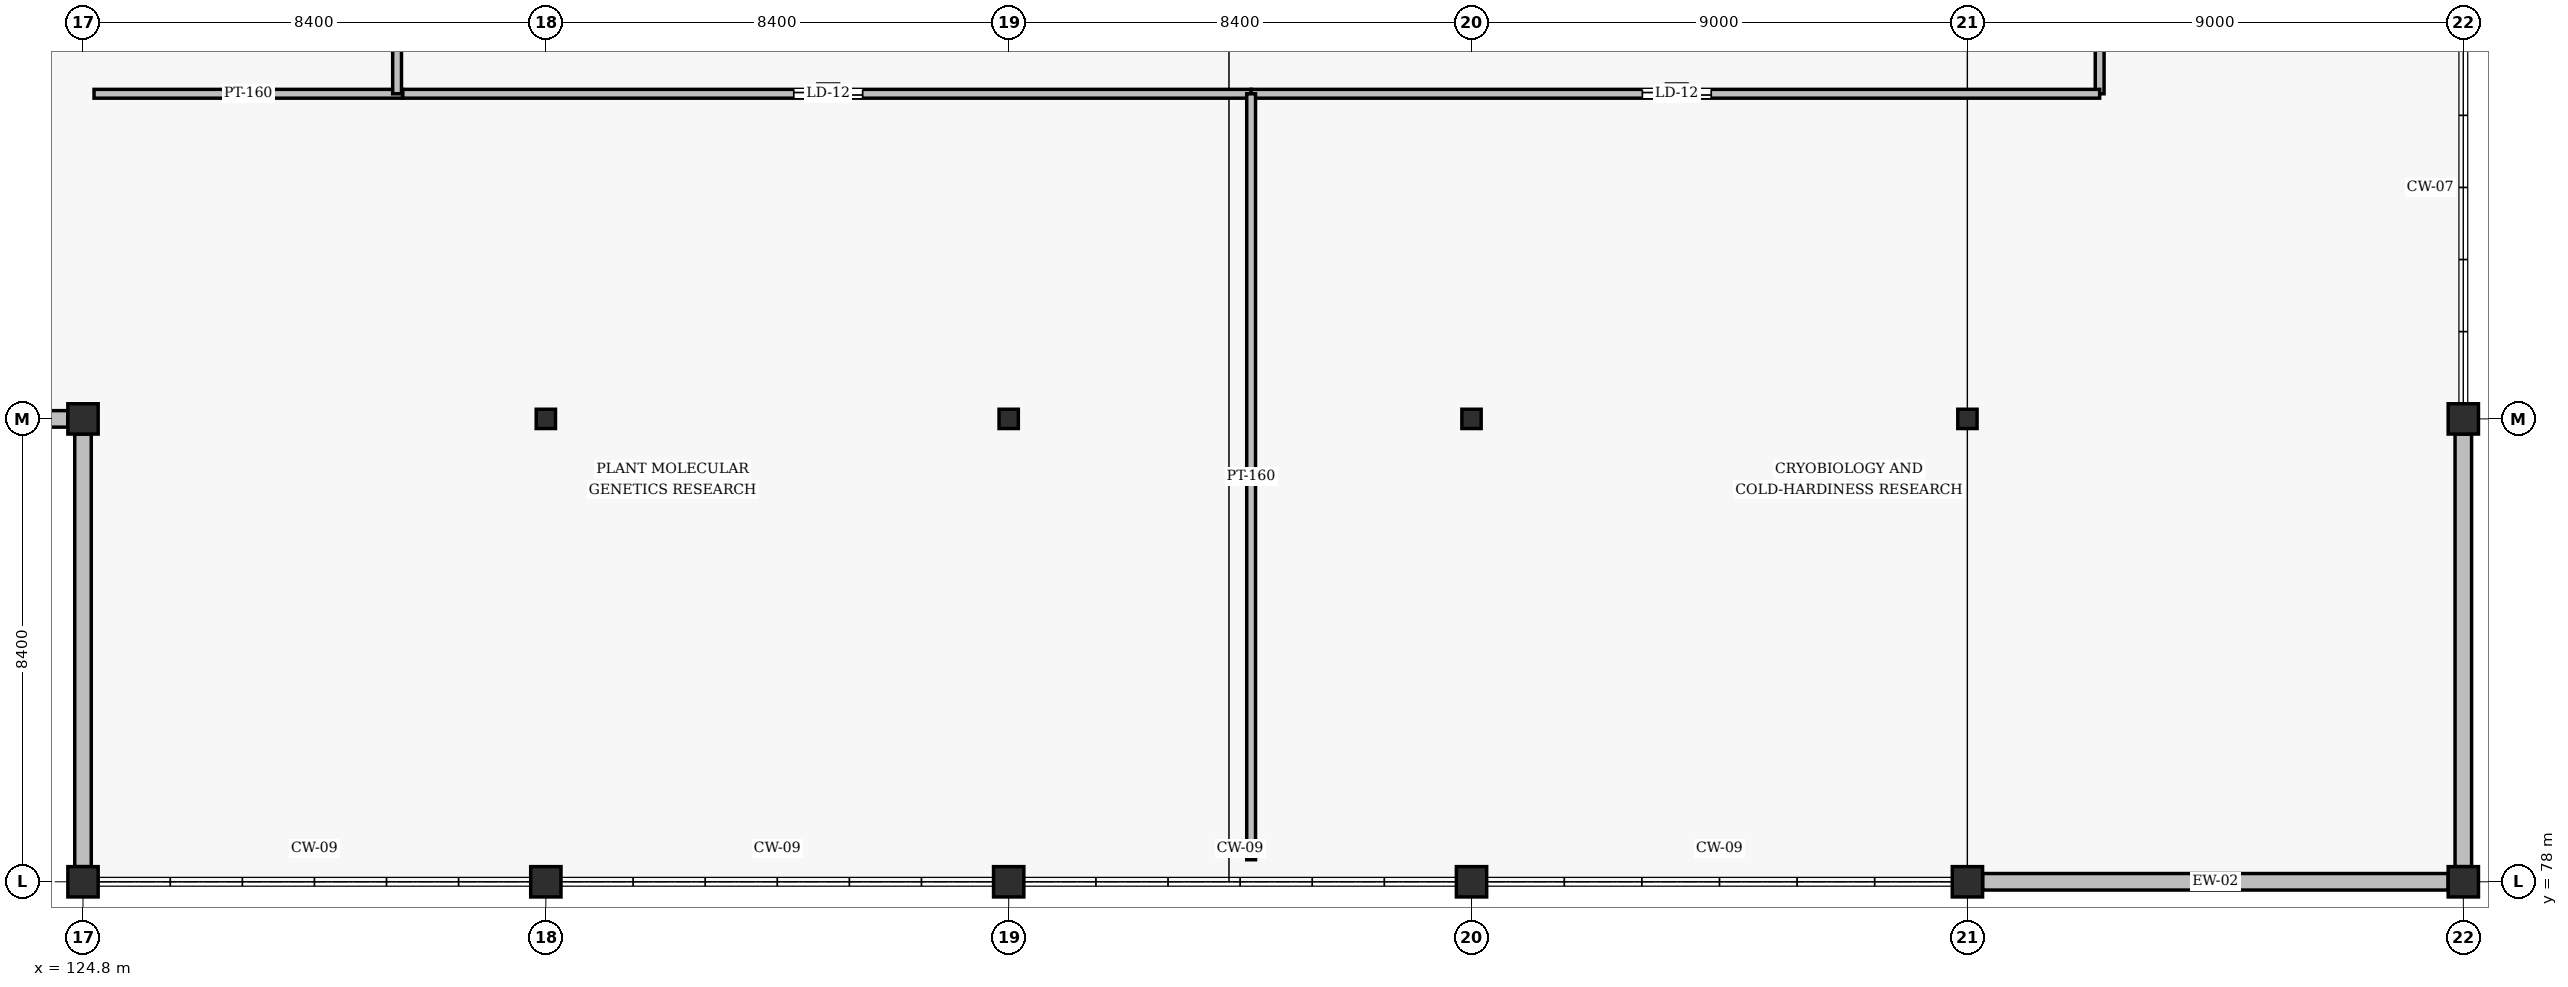
"""IFC4 building model, lengths in metres.
Left out: names, types, materials, properties, quantities, classifications, styles, units other than length and angle.
Written with IfcOpenShell. Run it as: python <this file> out.ifc"""

import sys

from ifc_helpers import new_model, si_unit, direction, frame, frame_2d, origin, origin_2d, place, context, subcontext, project, spatial, rectangle, hollow_rectangle, i_section, extrude, element, fill, save


model = new_model("IFC4")
c1 = context("Model", 3, precision=1e-05, world=origin(), true_north=direction((0.0, 1.0)))
c2 = subcontext(c1, "Body", "Model", "MODEL_VIEW")
j1 = project(units=[si_unit("LENGTHUNIT", "METRE"), si_unit("PLANEANGLEUNIT", "RADIAN")], contexts=[c1])
p1 = place(None, origin())
s1 = spatial("IfcSite", under=j1, at=p1, CompositionType="ELEMENT")
p2 = place(p1, origin())
s2 = spatial("IfcBuilding", under=s1, at=p2, CompositionType="ELEMENT")
p3 = place(p2, frame((0.0, 0.0, 24.6)))
s3 = spatial("IfcBuildingStorey", under=s2, at=p3, CompositionType="ELEMENT", Elevation=24.6)
for number, where, z_axis, x_axis in (
    (1, (124.8, 78.0, 0.0), (0.0, 0.0, 1.0), (1.0, 0.0, 0.0)),
    (2, (124.8, 86.4, 0.0), (0.0, 0.0, 1.0), (1.0, 0.0, 0.0)),
    (3, (133.2, 78.0, 0.0), (0.0, 0.0, 1.0), (1.0, 0.0, 0.0)),
):
    element("IfcColumn", number, at=place(p3, frame(where, z_axis=z_axis, x_axis=x_axis)), inside=s3, PredefinedType="COLUMN", context=c2, shape_type="SweptSolid", body=[
        extrude(hollow_rectangle(XDim=0.55, YDim=0.55, WallThickness=0.022, InnerFilletRadius=0.022, OuterFilletRadius=0.044, at=origin_2d()), origin(), (0.0, 0.0, 1.0), 3.6),
    ])
p4 = place(p3, frame((133.2, 86.4, 0.0), z_axis=(0.0, 0.0, 1.0), x_axis=(1.0, 0.0, 0.0)))
e4 = element("IfcColumn", 4, at=p4, inside=s3, PredefinedType="COLUMN", context=c2, shape_type="SweptSolid", body=[
    extrude(i_section(OverallWidth=0.35, OverallDepth=0.35, WebThickness=0.012, FlangeThickness=0.019, FilletRadius=0.02, at=origin_2d()), origin(), (0.0, 0.0, 1.0), 3.6),
])
p5 = place(p3, frame((141.6, 78.0, 0.0), z_axis=(0.0, 0.0, 1.0), x_axis=(1.0, 0.0, 0.0)))
e5 = element("IfcColumn", 5, at=p5, inside=s3, PredefinedType="COLUMN", context=c2, shape_type="SweptSolid", body=[
    extrude(hollow_rectangle(XDim=0.55, YDim=0.55, WallThickness=0.022, InnerFilletRadius=0.022, OuterFilletRadius=0.044, at=origin_2d()), origin(), (0.0, 0.0, 1.0), 3.576),
])
p6 = place(p3, frame((141.6, 86.4, 0.0), z_axis=(0.0, 0.0, 1.0), x_axis=(1.0, 0.0, 0.0)))
e6 = element("IfcColumn", 6, at=p6, inside=s3, PredefinedType="COLUMN", context=c2, shape_type="SweptSolid", body=[
    extrude(i_section(OverallWidth=0.35, OverallDepth=0.35, WebThickness=0.012, FlangeThickness=0.019, FilletRadius=0.02, at=origin_2d()), origin(), (0.0, 0.0, 1.0), 3.6),
])
p7 = place(p3, frame((150.0, 78.0, 0.0), z_axis=(0.0, 0.0, 1.0), x_axis=(1.0, 0.0, 0.0)))
e7 = element("IfcColumn", 7, at=p7, inside=s3, PredefinedType="COLUMN", context=c2, shape_type="SweptSolid", body=[
    extrude(hollow_rectangle(XDim=0.55, YDim=0.55, WallThickness=0.022, InnerFilletRadius=0.022, OuterFilletRadius=0.044, at=origin_2d()), origin(), (0.0, 0.0, 1.0), 3.6),
])
p8 = place(p3, frame((150.0, 86.4, 0.0), z_axis=(0.0, 0.0, 1.0), x_axis=(1.0, 0.0, 0.0)))
e8 = element("IfcColumn", 8, at=p8, inside=s3, PredefinedType="COLUMN", context=c2, shape_type="SweptSolid", body=[
    extrude(i_section(OverallWidth=0.35, OverallDepth=0.35, WebThickness=0.012, FlangeThickness=0.019, FilletRadius=0.02, at=origin_2d()), origin(), (0.0, 0.0, 1.0), 3.6),
])
p9 = place(p3, frame((159.0, 78.0, 0.0), z_axis=(0.0, 0.0, 1.0), x_axis=(1.0, 0.0, 0.0)))
e9 = element("IfcColumn", 9, at=p9, inside=s3, PredefinedType="COLUMN", context=c2, shape_type="SweptSolid", body=[
    extrude(hollow_rectangle(XDim=0.55, YDim=0.55, WallThickness=0.022, InnerFilletRadius=0.022, OuterFilletRadius=0.044, at=origin_2d()), origin(), (0.0, 0.0, 1.0), 3.6),
])
p10 = place(p3, frame((159.0, 86.4, 0.0), z_axis=(0.0, 0.0, 1.0), x_axis=(1.0, 0.0, 0.0)))
e10 = element("IfcColumn", 10, at=p10, inside=s3, PredefinedType="COLUMN", context=c2, shape_type="SweptSolid", body=[
    extrude(i_section(OverallWidth=0.35, OverallDepth=0.35, WebThickness=0.012, FlangeThickness=0.019, FilletRadius=0.02, at=origin_2d()), origin(), (0.0, 0.0, 1.0), 3.6),
])
for number, where, z_axis, x_axis in (
    (11, (168.0, 78.0, 0.0), (0.0, 0.0, 1.0), (1.0, 0.0, 0.0)),
    (12, (168.0, 86.4, 0.0), (0.0, 0.0, 1.0), (1.0, 0.0, 0.0)),
):
    element("IfcColumn", number, at=place(p3, frame(where, z_axis=z_axis, x_axis=x_axis)), inside=s3, PredefinedType="COLUMN", context=c2, shape_type="SweptSolid", body=[
        extrude(hollow_rectangle(XDim=0.55, YDim=0.55, WallThickness=0.022, InnerFilletRadius=0.022, OuterFilletRadius=0.044, at=origin_2d()), origin(), (0.0, 0.0, 1.0), 3.6),
    ])
p11 = place(p3, frame((120.725, 86.4, 0.0), z_axis=(0.0, 0.0, 1.0), x_axis=(1.0, 0.0, 0.0)))
e13 = element("IfcWall", 13, at=p11, inside=s3, PredefinedType="SOLIDWALL", context=c2, shape_type="SweptSolid", body=[
    extrude(rectangle(XDim=3.8, YDim=0.3, at=frame_2d((1.9, 0.0))), origin(), (0.0, 0.0, 1.0), 2.851),
])
p12 = place(p11, frame((0.85, 0.0, 0.85)))
e14 = element("IfcOpeningElement", 14, at=p12, cuts=e13, PredefinedType="OPENING", context=c2, shape_type="SweptSolid", body=[
    extrude(rectangle(XDim=2.1, YDim=1.7, at=frame_2d((1.05, 0.85))), frame((0.0, 0.16, 0.0), z_axis=(0.0, -1.0, 0.0), x_axis=(1.0, 0.0, 0.0)), (0.0, 0.0, 1.0), 0.32),
])
p13 = place(p3, frame((124.8, 86.125, 0.0), z_axis=(0.0, 0.0, 1.0), x_axis=(0.0, -1.0, 0.0)))
e15 = element("IfcWall", 15, at=p13, inside=s3, PredefinedType="SOLIDWALL", context=c2, shape_type="SweptSolid", body=[
    extrude(rectangle(XDim=7.85, YDim=0.3, at=frame_2d((3.925, 0.0))), origin(), (0.0, 0.0, 1.0), 2.845),
])
p14 = place(p3, frame((159.275, 78.0, 0.0), z_axis=(0.0, 0.0, 1.0), x_axis=(1.0, 0.0, 0.0)))
e16 = element("IfcWall", 16, at=p14, inside=s3, PredefinedType="SOLIDWALL", context=c2, shape_type="SweptSolid", body=[
    extrude(rectangle(XDim=8.45, YDim=0.3, at=frame_2d((4.225, 0.0))), origin(), (0.0, 0.0, 1.0), 2.553),
])
p15 = place(p3, frame((168.0, 78.275, 0.0), z_axis=(0.0, 0.0, 1.0), x_axis=(0.0, 1.0, 0.0)))
e17 = element("IfcWall", 17, at=p15, inside=s3, PredefinedType="SOLIDWALL", context=c2, shape_type="SweptSolid", body=[
    extrude(rectangle(XDim=7.85, YDim=0.3, at=frame_2d((3.925, 0.0))), origin(), (0.0, 0.0, 1.0), 2.845),
])
p16 = place(p3, frame((161.4, 92.3, 0.0), z_axis=(0.0, 0.0, 1.0), x_axis=(0.0, 1.0, 0.0)))
e18 = element("IfcWall", 18, at=p16, inside=s3, PredefinedType="PARTITIONING", context=c2, shape_type="SweptSolid", body=[
    extrude(rectangle(XDim=14.1, YDim=0.16, at=frame_2d((7.05, 0.0))), origin(), (0.0, 0.0, 1.0), 2.745),
])
p17 = place(p16, frame((6.5, 0.0, 0.0)))
e19 = element("IfcOpeningElement", 19, at=p17, cuts=e18, PredefinedType="OPENING", context=c2, shape_type="SweptSolid", body=[
    extrude(rectangle(XDim=1.08, YDim=2.08, at=frame_2d((0.54, 1.04))), frame((0.0, 0.09, 0.0), z_axis=(0.0, -1.0, 0.0), x_axis=(1.0, 0.0, 0.0)), (0.0, 0.0, 1.0), 0.18),
])
p18 = place(p3, frame((130.6, 92.3, 0.0), z_axis=(0.0, 0.0, 1.0), x_axis=(1.0, 0.0, 0.0)))
e20 = element("IfcWall", 20, at=p18, inside=s3, PredefinedType="PARTITIONING", context=c2, shape_type="SweptSolid", body=[
    extrude(rectangle(XDim=15.4, YDim=0.16, at=frame_2d((7.7, 0.0))), origin(), (0.0, 0.0, 1.0), 2.845),
])
p19 = place(p18, frame((7.1, 0.0, 0.0)))
e21 = element("IfcOpeningElement", 21, at=p19, cuts=e20, PredefinedType="OPENING", context=c2, shape_type="SweptSolid", body=[
    extrude(rectangle(XDim=1.25, YDim=2.12, at=frame_2d((0.625, 1.06))), frame((0.0, 0.09, 0.0), z_axis=(0.0, -1.0, 0.0), x_axis=(1.0, 0.0, 0.0)), (0.0, 0.0, 1.0), 0.18),
])
p20 = place(p3, frame((146.0, 92.3, 0.0), z_axis=(0.0, 0.0, 1.0), x_axis=(1.0, 0.0, 0.0)))
e22 = element("IfcWall", 22, at=p20, inside=s3, PredefinedType="PARTITIONING", context=c2, shape_type="SweptSolid", body=[
    extrude(rectangle(XDim=15.4, YDim=0.16, at=frame_2d((7.7, 0.0))), origin(), (0.0, 0.0, 1.0), 2.845),
])
p21 = place(p20, frame((7.1, 0.0, 0.0)))
e23 = element("IfcOpeningElement", 23, at=p21, cuts=e22, PredefinedType="OPENING", context=c2, shape_type="SweptSolid", body=[
    extrude(rectangle(XDim=1.25, YDim=2.12, at=frame_2d((0.625, 1.06))), frame((0.0, 0.09, 0.0), z_axis=(0.0, -1.0, 0.0), x_axis=(1.0, 0.0, 0.0)), (0.0, 0.0, 1.0), 0.18),
])
p22 = place(p3, frame((125.0, 92.3, 0.0), z_axis=(0.0, 0.0, 1.0), x_axis=(1.0, 0.0, 0.0)))
e24 = element("IfcWall", 24, at=p22, inside=s3, PredefinedType="PARTITIONING", context=c2, shape_type="SweptSolid", body=[
    extrude(rectangle(XDim=5.6, YDim=0.16, at=frame_2d((2.8, 0.0))), origin(), (0.0, 0.0, 1.0), 3.345),
])
p23 = place(p3, frame((146.0, 78.4, 0.0), z_axis=(0.0, 0.0, 1.0), x_axis=(0.0, 1.0, 0.0)))
e25 = element("IfcWall", 25, at=p23, inside=s3, PredefinedType="PARTITIONING", context=c2, shape_type="SweptSolid", body=[
    extrude(rectangle(XDim=13.9, YDim=0.16, at=frame_2d((6.95, 0.0))), origin(), (0.0, 0.0, 1.0), 2.845),
])
p24 = place(p3, frame((130.5, 92.3, 0.0), z_axis=(0.0, 0.0, 1.0), x_axis=(0.0, 1.0, 0.0)))
e26 = element("IfcWall", 26, at=p24, inside=s3, PredefinedType="PARTITIONING", context=c2, shape_type="SweptSolid", body=[
    extrude(rectangle(XDim=10.9, YDim=0.16, at=frame_2d((5.45, 0.0))), origin(), (0.0, 0.0, 1.0), 2.845),
])
p25 = place(p24, frame((4.9, 0.0, 0.0)))
e27 = element("IfcOpeningElement", 27, at=p25, cuts=e26, PredefinedType="OPENING", context=c2, shape_type="SweptSolid", body=[
    extrude(rectangle(XDim=1.14, YDim=2.12, at=frame_2d((0.57, 1.06))), frame((0.0, 0.09, 0.0), z_axis=(0.0, -1.0, 0.0), x_axis=(1.0, 0.0, 0.0)), (0.0, 0.0, 1.0), 0.18),
])
p26 = place(p19, origin())
e28 = element("IfcDoor", 28, at=p26, inside=s3, OperationType="SINGLE_SWING_LEFT", PredefinedType="DOOR", context=c2, shape_type="SweptSolid", body=[
    extrude(rectangle(XDim=1.25, YDim=2.12, at=frame_2d((0.625, 1.06))), frame((0.0, 0.025, 0.0), z_axis=(0.0, -1.0, 0.0), x_axis=(1.0, 0.0, 0.0)), (0.0, 0.0, 1.0), 0.05),
])
fill(e21, e28)
p27 = place(p21, origin())
e29 = element("IfcDoor", 29, at=p27, inside=s3, OperationType="SINGLE_SWING_LEFT", PredefinedType="DOOR", context=c2, shape_type="SweptSolid", body=[
    extrude(rectangle(XDim=1.25, YDim=2.12, at=frame_2d((0.625, 1.06))), frame((0.0, 0.025, 0.0), z_axis=(0.0, -1.0, 0.0), x_axis=(1.0, 0.0, 0.0)), (0.0, 0.0, 1.0), 0.05),
])
fill(e23, e29)
save(model, sys.argv[1])
